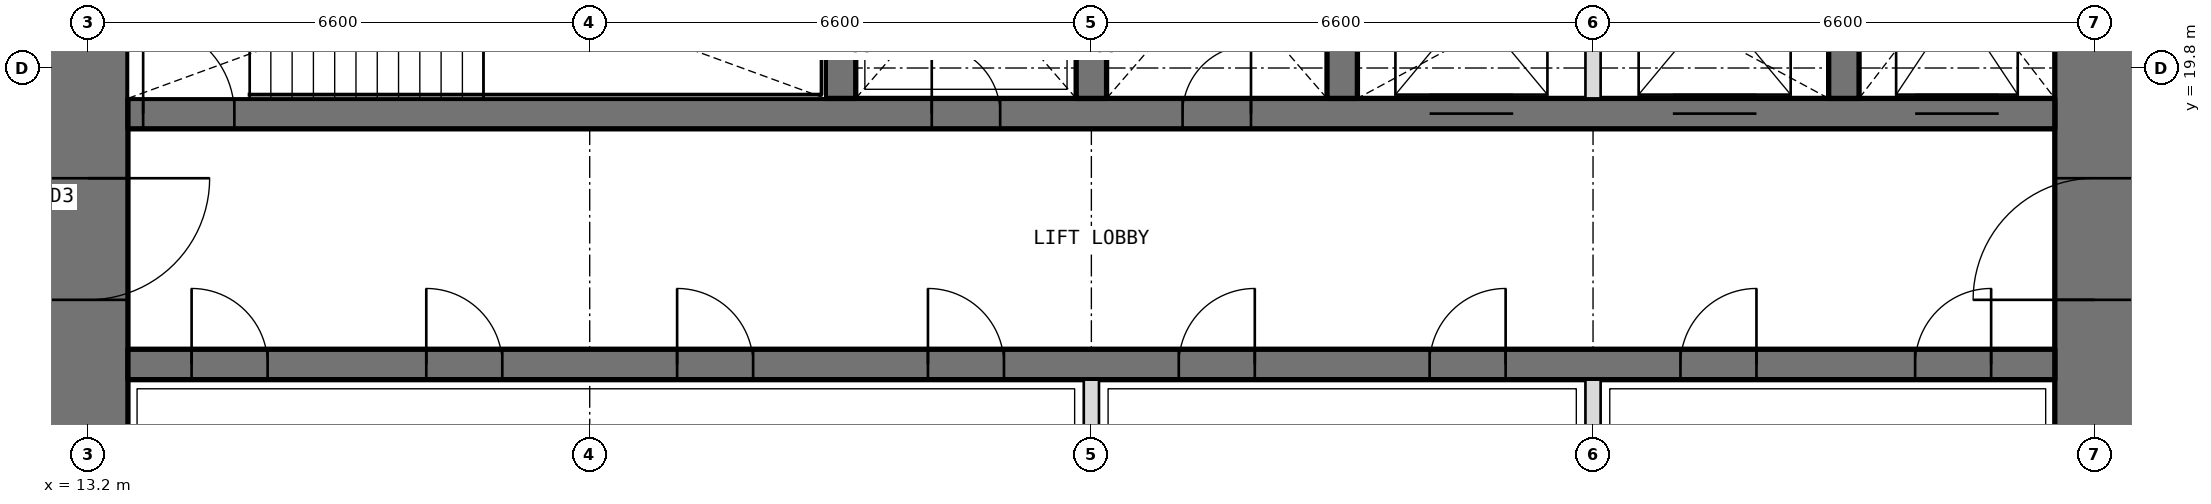
"""IFC4 building model, lengths in metres.
Left out: names, types, materials, properties, quantities, classifications, styles, units other than length and angle.
Written with IfcOpenShell. Run it as: python <this file> out.ifc"""

import sys

from ifc_helpers import new_model, si_unit, direction, frame, frame_2d, origin, place, context, subcontext, project, spatial, rectangle, extrude, element, fill, save


model = new_model("IFC4")
c1 = context("Model", 3, precision=1e-05, world=origin(), true_north=direction((0.0, 1.0)))
c2 = subcontext(c1, "Body", "Model", "MODEL_VIEW")
j1 = project(units=[si_unit("LENGTHUNIT", "METRE"), si_unit("PLANEANGLEUNIT", "RADIAN")], contexts=[c1])
p1 = place(None, origin())
s1 = spatial("IfcSite", under=j1, at=p1, CompositionType="ELEMENT")
p2 = place(p1, origin())
s2 = spatial("IfcBuilding", under=s1, at=p2, CompositionType="ELEMENT")
p3 = place(p2, frame((0.0, 0.0, 193.5)))
s3 = spatial("IfcBuildingStorey", under=s2, at=p3, CompositionType="ELEMENT", Elevation=193.5)
p4 = place(p3, frame((39.6, 13.725, 0.0), z_axis=(0.0, 0.0, 1.0), x_axis=(0.0, 1.0, 0.0)))
e1 = element("IfcWall", 1, at=p4, inside=s3, PredefinedType="SHEAR", context=c2, shape_type="SweptSolid", body=[
    extrude(rectangle(XDim=18.75, YDim=1.05, at=frame_2d((9.375, 0.0))), origin(), (0.0, 0.0, 1.0), 4.2),
])
p5 = place(p4, frame((3.025, 0.0, 0.0)))
e2 = element("IfcOpeningElement", 2, at=p5, cuts=e1, PredefinedType="OPENING", context=c2, shape_type="SweptSolid", body=[
    extrude(rectangle(XDim=1.6, YDim=2.1, at=frame_2d((0.8, 1.05))), frame((0.0, 0.535, 0.0), z_axis=(0.0, -1.0, 0.0), x_axis=(1.0, 0.0, 0.0)), (0.0, 0.0, 1.0), 1.07),
])
p6 = place(p4, frame((13.825, 0.0, 0.0)))
e3 = element("IfcOpeningElement", 3, at=p6, cuts=e1, PredefinedType="OPENING", context=c2, shape_type="SweptSolid", body=[
    extrude(rectangle(XDim=1.6, YDim=2.1, at=frame_2d((0.8, 1.05))), frame((0.0, 0.535, 0.0), z_axis=(0.0, -1.0, 0.0), x_axis=(1.0, 0.0, 0.0)), (0.0, 0.0, 1.0), 1.07),
])
p7 = place(p3, frame((13.2, 32.475, 0.0), z_axis=(0.0, 0.0, 1.0), x_axis=(0.0, -1.0, 0.0)))
e4 = element("IfcWall", 4, at=p7, inside=s3, PredefinedType="SHEAR", context=c2, shape_type="SweptSolid", body=[
    extrude(rectangle(XDim=18.75, YDim=1.05, at=frame_2d((9.375, 0.0))), origin(), (0.0, 0.0, 1.0), 4.2),
])
p8 = place(p7, frame((14.125, 0.0, 0.0)))
e5 = element("IfcOpeningElement", 5, at=p8, cuts=e4, PredefinedType="OPENING", context=c2, shape_type="SweptSolid", body=[
    extrude(rectangle(XDim=1.6, YDim=2.1, at=frame_2d((0.8, 1.05))), frame((0.0, 0.535, 0.0), z_axis=(0.0, -1.0, 0.0), x_axis=(1.0, 0.0, 0.0)), (0.0, 0.0, 1.0), 1.07),
])
p9 = place(p7, frame((3.325, 0.0, 0.0)))
e6 = element("IfcOpeningElement", 6, at=p9, cuts=e4, PredefinedType="OPENING", context=c2, shape_type="SweptSolid", body=[
    extrude(rectangle(XDim=1.6, YDim=2.1, at=frame_2d((0.8, 1.05))), frame((0.0, 0.535, 0.0), z_axis=(0.0, -1.0, 0.0), x_axis=(1.0, 0.0, 0.0)), (0.0, 0.0, 1.0), 1.07),
])
p10 = place(p3, frame((13.725, 15.9, 0.0), z_axis=(0.0, 0.0, 1.0), x_axis=(1.0, 0.0, 0.0)))
e7 = element("IfcWall", 7, at=p10, inside=s3, PredefinedType="SHEAR", context=c2, shape_type="SweptSolid", body=[
    extrude(rectangle(XDim=25.35, YDim=0.4, at=frame_2d((12.675, 0.0))), origin(), (0.0, 0.0, 1.0), 4.2),
])
p11 = place(p10, frame((0.837, 0.0, 0.0)))
e8 = element("IfcOpeningElement", 8, at=p11, cuts=e7, PredefinedType="OPENING", context=c2, shape_type="SweptSolid", body=[
    extrude(rectangle(XDim=1.0, YDim=2.1, at=frame_2d((0.5, 1.05))), frame((0.0, 0.21, 0.0), z_axis=(0.0, -1.0, 0.0), x_axis=(1.0, 0.0, 0.0)), (0.0, 0.0, 1.0), 0.42),
])
p12 = place(p10, frame((3.925, 0.0, 0.0)))
e9 = element("IfcOpeningElement", 9, at=p12, cuts=e7, PredefinedType="OPENING", context=c2, shape_type="SweptSolid", body=[
    extrude(rectangle(XDim=1.0, YDim=2.1, at=frame_2d((0.5, 1.05))), frame((0.0, 0.21, 0.0), z_axis=(0.0, -1.0, 0.0), x_axis=(1.0, 0.0, 0.0)), (0.0, 0.0, 1.0), 0.42),
])
p13 = place(p10, frame((7.225, 0.0, 0.0)))
e10 = element("IfcOpeningElement", 10, at=p13, cuts=e7, PredefinedType="OPENING", context=c2, shape_type="SweptSolid", body=[
    extrude(rectangle(XDim=1.0, YDim=2.1, at=frame_2d((0.5, 1.05))), frame((0.0, 0.21, 0.0), z_axis=(0.0, -1.0, 0.0), x_axis=(1.0, 0.0, 0.0)), (0.0, 0.0, 1.0), 0.42),
])
p14 = place(p10, frame((10.525, 0.0, 0.0)))
e11 = element("IfcOpeningElement", 11, at=p14, cuts=e7, PredefinedType="OPENING", context=c2, shape_type="SweptSolid", body=[
    extrude(rectangle(XDim=1.0, YDim=2.1, at=frame_2d((0.5, 1.05))), frame((0.0, 0.21, 0.0), z_axis=(0.0, -1.0, 0.0), x_axis=(1.0, 0.0, 0.0)), (0.0, 0.0, 1.0), 0.42),
])
p15 = place(p10, frame((13.825, 0.0, 0.0)))
e12 = element("IfcOpeningElement", 12, at=p15, cuts=e7, PredefinedType="OPENING", context=c2, shape_type="SweptSolid", body=[
    extrude(rectangle(XDim=1.0, YDim=2.1, at=frame_2d((0.5, 1.05))), frame((0.0, 0.21, 0.0), z_axis=(0.0, -1.0, 0.0), x_axis=(1.0, 0.0, 0.0)), (0.0, 0.0, 1.0), 0.42),
])
p16 = place(p10, frame((17.125, 0.0, 0.0)))
e13 = element("IfcOpeningElement", 13, at=p16, cuts=e7, PredefinedType="OPENING", context=c2, shape_type="SweptSolid", body=[
    extrude(rectangle(XDim=1.0, YDim=2.1, at=frame_2d((0.5, 1.05))), frame((0.0, 0.21, 0.0), z_axis=(0.0, -1.0, 0.0), x_axis=(1.0, 0.0, 0.0)), (0.0, 0.0, 1.0), 0.42),
])
p17 = place(p10, frame((20.425, 0.0, 0.0)))
e14 = element("IfcOpeningElement", 14, at=p17, cuts=e7, PredefinedType="OPENING", context=c2, shape_type="SweptSolid", body=[
    extrude(rectangle(XDim=1.0, YDim=2.1, at=frame_2d((0.5, 1.05))), frame((0.0, 0.21, 0.0), z_axis=(0.0, -1.0, 0.0), x_axis=(1.0, 0.0, 0.0)), (0.0, 0.0, 1.0), 0.42),
])
p18 = place(p10, frame((23.512, 0.0, 0.0)))
e15 = element("IfcOpeningElement", 15, at=p18, cuts=e7, PredefinedType="OPENING", context=c2, shape_type="SweptSolid", body=[
    extrude(rectangle(XDim=1.0, YDim=2.1, at=frame_2d((0.5, 1.05))), frame((0.0, 0.21, 0.0), z_axis=(0.0, -1.0, 0.0), x_axis=(1.0, 0.0, 0.0)), (0.0, 0.0, 1.0), 0.42),
])
p19 = place(p3, frame((13.725, 19.2, 0.0), z_axis=(0.0, 0.0, 1.0), x_axis=(1.0, 0.0, 0.0)))
e16 = element("IfcWall", 16, at=p19, inside=s3, PredefinedType="SHEAR", context=c2, shape_type="SweptSolid", body=[
    extrude(rectangle(XDim=25.35, YDim=0.4, at=frame_2d((12.675, 0.0))), origin(), (0.0, 0.0, 1.0), 4.2),
])
p20 = place(p19, frame((10.575, 0.0, 0.0)))
e17 = element("IfcOpeningElement", 17, at=p20, cuts=e16, PredefinedType="OPENING", context=c2, shape_type="SweptSolid", body=[
    extrude(rectangle(XDim=0.9, YDim=2.1, at=frame_2d((0.45, 1.05))), frame((0.0, 0.21, 0.0), z_axis=(0.0, -1.0, 0.0), x_axis=(1.0, 0.0, 0.0)), (0.0, 0.0, 1.0), 0.42),
])
p21 = place(p19, frame((13.875, 0.0, 0.0)))
e18 = element("IfcOpeningElement", 18, at=p21, cuts=e16, PredefinedType="OPENING", context=c2, shape_type="SweptSolid", body=[
    extrude(rectangle(XDim=0.9, YDim=2.1, at=frame_2d((0.45, 1.05))), frame((0.0, 0.21, 0.0), z_axis=(0.0, -1.0, 0.0), x_axis=(1.0, 0.0, 0.0)), (0.0, 0.0, 1.0), 0.42),
])
p22 = place(p19, frame((0.2, 0.0, 0.0)))
e19 = element("IfcOpeningElement", 19, at=p22, cuts=e16, PredefinedType="OPENING", context=c2, shape_type="SweptSolid", body=[
    extrude(rectangle(XDim=1.2, YDim=2.1, at=frame_2d((0.6, 1.05))), frame((0.0, 0.21, 0.0), z_axis=(0.0, -1.0, 0.0), x_axis=(1.0, 0.0, 0.0)), (0.0, 0.0, 1.0), 0.42),
])
p23 = place(p19, frame((23.512, 0.0, 0.0)))
e20 = element("IfcOpeningElement", 20, at=p23, cuts=e16, PredefinedType="OPENING", context=c2, shape_type="SweptSolid", body=[
    extrude(rectangle(XDim=1.1, YDim=2.1, at=frame_2d((0.55, 1.05))), frame((0.0, 0.21, 0.0), z_axis=(0.0, -1.0, 0.0), x_axis=(1.0, 0.0, 0.0)), (0.0, 0.0, 1.0), 0.42),
])
p24 = place(p19, frame((17.125, 0.0, 0.0)))
e21 = element("IfcOpeningElement", 21, at=p24, cuts=e16, PredefinedType="OPENING", context=c2, shape_type="SweptSolid", body=[
    extrude(rectangle(XDim=1.1, YDim=2.1, at=frame_2d((0.55, 1.05))), frame((0.0, 0.21, 0.0), z_axis=(0.0, -1.0, 0.0), x_axis=(1.0, 0.0, 0.0)), (0.0, 0.0, 1.0), 0.42),
])
p25 = place(p19, frame((20.325, 0.0, 0.0)))
e22 = element("IfcOpeningElement", 22, at=p25, cuts=e16, PredefinedType="OPENING", context=c2, shape_type="SweptSolid", body=[
    extrude(rectangle(XDim=1.1, YDim=2.1, at=frame_2d((0.55, 1.05))), frame((0.0, 0.21, 0.0), z_axis=(0.0, -1.0, 0.0), x_axis=(1.0, 0.0, 0.0)), (0.0, 0.0, 1.0), 0.42),
])
for number, where, z_axis, x_axis in (
    (23, (23.1, 19.4, 0.0), (0.0, 0.0, 1.0), (0.0, 1.0, 0.0)),
    (24, (26.4, 19.4, 0.0), (0.0, 0.0, 1.0), (0.0, 1.0, 0.0)),
    (25, (29.7, 19.4, 0.0), (0.0, 0.0, 1.0), (0.0, 1.0, 0.0)),
    (26, (36.3, 19.4, 0.0), (0.0, 0.0, 1.0), (0.0, 1.0, 0.0)),
):
    element("IfcWall", number, at=place(p3, frame(where, z_axis=z_axis, x_axis=x_axis)), inside=s3, PredefinedType="SHEAR", context=c2, shape_type="SweptSolid", body=[
        extrude(rectangle(XDim=3.35, YDim=0.4, at=frame_2d((1.675, 0.0))), origin(), (0.0, 0.0, 1.0), 4.2),
    ])
for number, where, z_axis, x_axis in (
    (27, (26.4, 13.725, 0.0), (0.0, 0.0, 1.0), (0.0, 1.0, 0.0)),
    (28, (33.0, 13.725, 0.0), (0.0, 0.0, 1.0), (0.0, 1.0, 0.0)),
):
    element("IfcWall", number, at=place(p3, frame(where, z_axis=z_axis, x_axis=x_axis)), inside=s3, PredefinedType="PARTITIONING", context=c2, shape_type="SweptSolid", body=[
        extrude(rectangle(XDim=1.975, YDim=0.2, at=frame_2d((0.987, 0.0))), origin(), (0.0, 0.0, 1.0), 4.2),
    ])
p26 = place(p3, frame((33.0, 19.4, 0.0), z_axis=(0.0, 0.0, 1.0), x_axis=(0.0, 1.0, 0.0)))
e29 = element("IfcWall", 29, at=p26, inside=s3, PredefinedType="PARTITIONING", context=c2, shape_type="SweptSolid", body=[
    extrude(rectangle(XDim=3.35, YDim=0.2, at=frame_2d((1.675, 0.0))), origin(), (0.0, 0.0, 1.0), 4.2),
])
p27 = place(p20, origin())
e30 = element("IfcDoor", 30, at=p27, inside=s3, OperationType="SINGLE_SWING_LEFT", PredefinedType="DOOR", context=c2, shape_type="SweptSolid", body=[
    extrude(rectangle(XDim=0.9, YDim=2.1, at=frame_2d((0.45, 1.05))), frame((0.0, 0.025, 0.0), z_axis=(0.0, -1.0, 0.0), x_axis=(1.0, 0.0, 0.0)), (0.0, 0.0, 1.0), 0.05),
])
fill(e17, e30)
p28 = place(p21, origin())
e31 = element("IfcDoor", 31, at=p28, inside=s3, OperationType="SINGLE_SWING_RIGHT", PredefinedType="DOOR", context=c2, shape_type="SweptSolid", body=[
    extrude(rectangle(XDim=0.9, YDim=2.1, at=frame_2d((0.45, 1.05))), frame((0.0, 0.025, 0.0), z_axis=(0.0, -1.0, 0.0), x_axis=(1.0, 0.0, 0.0)), (0.0, 0.0, 1.0), 0.05),
])
fill(e18, e31)
p29 = place(p11, origin())
e32 = element("IfcDoor", 32, at=p29, inside=s3, OperationType="SINGLE_SWING_LEFT", PredefinedType="DOOR", context=c2, shape_type="SweptSolid", body=[
    extrude(rectangle(XDim=1.0, YDim=2.1, at=frame_2d((0.5, 1.05))), frame((0.0, 0.025, 0.0), z_axis=(0.0, -1.0, 0.0), x_axis=(1.0, 0.0, 0.0)), (0.0, 0.0, 1.0), 0.05),
])
fill(e8, e32)
p30 = place(p12, origin())
e33 = element("IfcDoor", 33, at=p30, inside=s3, OperationType="SINGLE_SWING_LEFT", PredefinedType="DOOR", context=c2, shape_type="SweptSolid", body=[
    extrude(rectangle(XDim=1.0, YDim=2.1, at=frame_2d((0.5, 1.05))), frame((0.0, 0.025, 0.0), z_axis=(0.0, -1.0, 0.0), x_axis=(1.0, 0.0, 0.0)), (0.0, 0.0, 1.0), 0.05),
])
fill(e9, e33)
p31 = place(p13, origin())
e34 = element("IfcDoor", 34, at=p31, inside=s3, OperationType="SINGLE_SWING_LEFT", PredefinedType="DOOR", context=c2, shape_type="SweptSolid", body=[
    extrude(rectangle(XDim=1.0, YDim=2.1, at=frame_2d((0.5, 1.05))), frame((0.0, 0.025, 0.0), z_axis=(0.0, -1.0, 0.0), x_axis=(1.0, 0.0, 0.0)), (0.0, 0.0, 1.0), 0.05),
])
fill(e10, e34)
p32 = place(p14, origin())
e35 = element("IfcDoor", 35, at=p32, inside=s3, OperationType="SINGLE_SWING_LEFT", PredefinedType="DOOR", context=c2, shape_type="SweptSolid", body=[
    extrude(rectangle(XDim=1.0, YDim=2.1, at=frame_2d((0.5, 1.05))), frame((0.0, 0.025, 0.0), z_axis=(0.0, -1.0, 0.0), x_axis=(1.0, 0.0, 0.0)), (0.0, 0.0, 1.0), 0.05),
])
fill(e11, e35)
p33 = place(p15, origin())
e36 = element("IfcDoor", 36, at=p33, inside=s3, OperationType="SINGLE_SWING_RIGHT", PredefinedType="DOOR", context=c2, shape_type="SweptSolid", body=[
    extrude(rectangle(XDim=1.0, YDim=2.1, at=frame_2d((0.5, 1.05))), frame((0.0, 0.025, 0.0), z_axis=(0.0, -1.0, 0.0), x_axis=(1.0, 0.0, 0.0)), (0.0, 0.0, 1.0), 0.05),
])
fill(e12, e36)
p34 = place(p16, origin())
e37 = element("IfcDoor", 37, at=p34, inside=s3, OperationType="SINGLE_SWING_RIGHT", PredefinedType="DOOR", context=c2, shape_type="SweptSolid", body=[
    extrude(rectangle(XDim=1.0, YDim=2.1, at=frame_2d((0.5, 1.05))), frame((0.0, 0.025, 0.0), z_axis=(0.0, -1.0, 0.0), x_axis=(1.0, 0.0, 0.0)), (0.0, 0.0, 1.0), 0.05),
])
fill(e13, e37)
p35 = place(p17, origin())
e38 = element("IfcDoor", 38, at=p35, inside=s3, OperationType="SINGLE_SWING_RIGHT", PredefinedType="DOOR", context=c2, shape_type="SweptSolid", body=[
    extrude(rectangle(XDim=1.0, YDim=2.1, at=frame_2d((0.5, 1.05))), frame((0.0, 0.025, 0.0), z_axis=(0.0, -1.0, 0.0), x_axis=(1.0, 0.0, 0.0)), (0.0, 0.0, 1.0), 0.05),
])
fill(e14, e38)
p36 = place(p18, origin())
e39 = element("IfcDoor", 39, at=p36, inside=s3, OperationType="SINGLE_SWING_RIGHT", PredefinedType="DOOR", context=c2, shape_type="SweptSolid", body=[
    extrude(rectangle(XDim=1.0, YDim=2.1, at=frame_2d((0.5, 1.05))), frame((0.0, 0.025, 0.0), z_axis=(0.0, -1.0, 0.0), x_axis=(1.0, 0.0, 0.0)), (0.0, 0.0, 1.0), 0.05),
])
fill(e15, e39)
p37 = place(p22, origin())
e40 = element("IfcDoor", 40, at=p37, inside=s3, OperationType="SINGLE_SWING_LEFT", PredefinedType="DOOR", context=c2, shape_type="SweptSolid", body=[
    extrude(rectangle(XDim=1.2, YDim=2.1, at=frame_2d((0.6, 1.05))), frame((0.0, 0.025, 0.0), z_axis=(0.0, -1.0, 0.0), x_axis=(1.0, 0.0, 0.0)), (0.0, 0.0, 1.0), 0.05),
])
fill(e19, e40)
p38 = place(p8, origin())
e41 = element("IfcDoor", 41, at=p38, inside=s3, OperationType="DOUBLE_DOOR_DOUBLE_SWING", PredefinedType="DOOR", context=c2, shape_type="SweptSolid", body=[
    extrude(rectangle(XDim=1.6, YDim=2.1, at=frame_2d((0.8, 1.05))), frame((0.0, 0.025, 0.0), z_axis=(0.0, -1.0, 0.0), x_axis=(1.0, 0.0, 0.0)), (0.0, 0.0, 1.0), 0.05),
])
fill(e5, e41)
p39 = place(p5, origin())
e42 = element("IfcDoor", 42, at=p39, inside=s3, OperationType="DOUBLE_DOOR_DOUBLE_SWING", PredefinedType="DOOR", context=c2, shape_type="SweptSolid", body=[
    extrude(rectangle(XDim=1.6, YDim=2.1, at=frame_2d((0.8, 1.05))), frame((0.0, 0.025, 0.0), z_axis=(0.0, -1.0, 0.0), x_axis=(1.0, 0.0, 0.0)), (0.0, 0.0, 1.0), 0.05),
])
fill(e2, e42)
p40 = place(p23, origin())
e43 = element("IfcDoor", 43, at=p40, inside=s3, OperationType="DOUBLE_DOOR_SLIDING", PredefinedType="DOOR", context=c2, shape_type="SweptSolid", body=[
    extrude(rectangle(XDim=1.1, YDim=2.1, at=frame_2d((0.55, 1.05))), frame((0.0, 0.025, 0.0), z_axis=(0.0, -1.0, 0.0), x_axis=(1.0, 0.0, 0.0)), (0.0, 0.0, 1.0), 0.05),
])
fill(e20, e43)
p41 = place(p24, origin())
e44 = element("IfcDoor", 44, at=p41, inside=s3, OperationType="DOUBLE_DOOR_SLIDING", PredefinedType="DOOR", context=c2, shape_type="SweptSolid", body=[
    extrude(rectangle(XDim=1.1, YDim=2.1, at=frame_2d((0.55, 1.05))), frame((0.0, 0.025, 0.0), z_axis=(0.0, -1.0, 0.0), x_axis=(1.0, 0.0, 0.0)), (0.0, 0.0, 1.0), 0.05),
])
fill(e21, e44)
p42 = place(p25, origin())
e45 = element("IfcDoor", 45, at=p42, inside=s3, OperationType="DOUBLE_DOOR_SLIDING", PredefinedType="DOOR", context=c2, shape_type="SweptSolid", body=[
    extrude(rectangle(XDim=1.1, YDim=2.1, at=frame_2d((0.55, 1.05))), frame((0.0, 0.025, 0.0), z_axis=(0.0, -1.0, 0.0), x_axis=(1.0, 0.0, 0.0)), (0.0, 0.0, 1.0), 0.05),
])
fill(e22, e45)
save(model, sys.argv[1])
